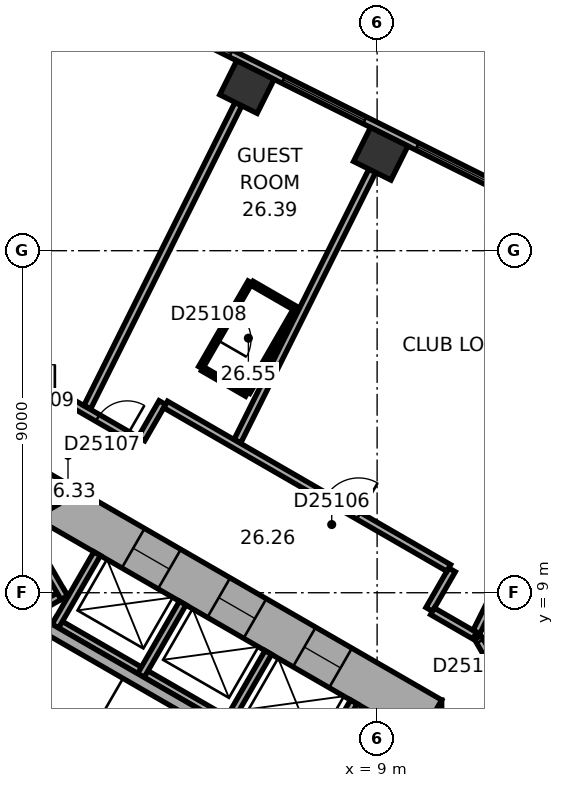
"""IFC4 building model, lengths in metres.
Left out: names, types, materials, properties, quantities, classifications, styles, units other than length and angle.
Written with IfcOpenShell. Run it as: python <this file> out.ifc"""

import sys

from ifc_helpers import new_model, si_unit, direction, frame, frame_2d, origin, origin_2d, place, context, subcontext, project, spatial, rectangle, extrude, element, fill, save


model = new_model("IFC4")
c1 = context("Model", 3, precision=1e-05, world=origin(), true_north=direction((0.0, 1.0)))
c2 = subcontext(c1, "Body", "Model", "MODEL_VIEW")
j1 = project(units=[si_unit("LENGTHUNIT", "METRE"), si_unit("PLANEANGLEUNIT", "RADIAN")], contexts=[c1])
p1 = place(None, origin())
s1 = spatial("IfcSite", under=j1, at=p1, CompositionType="ELEMENT")
p2 = place(p1, origin())
s2 = spatial("IfcBuilding", under=s1, at=p2, CompositionType="ELEMENT")
p3 = place(p2, frame((0.0, 0.0, 110.0)))
s3 = spatial("IfcBuildingStorey", under=s2, at=p3, CompositionType="ELEMENT", Elevation=110.0)
for number, where, z_axis, x_axis in (
    (1, (9.095, 20.551, 0.0), (0.0, 0.0, 1.0), (-0.895, 0.446, 0.0)),
    (2, (5.574, 22.306, 0.0), (0.0, 0.0, 1.0), (-0.895, 0.446, 0.0)),
):
    element("IfcColumn", number, at=place(p3, frame(where, z_axis=z_axis, x_axis=x_axis)), inside=s3, PredefinedType="COLUMN", context=c2, shape_type="SweptSolid", body=[
        extrude(rectangle(XDim=1.1, YDim=1.0, at=origin_2d()), origin(), (0.0, 0.0, 1.0), 3.3),
    ])
p4 = place(p3, frame((10.1, -6.177, 0.0), z_axis=(0.0, 0.0, 1.0), x_axis=(0.0, 1.0, 0.0)))
e3 = element("IfcWall", 3, at=p4, inside=s3, PredefinedType="SHEAR", context=c2, shape_type="SweptSolid", body=[
    extrude(rectangle(XDim=12.355, YDim=1.2, at=frame_2d((6.177, 0.0))), origin(), (0.0, 0.0, 1.0), 3.3),
])
p5 = place(p4, frame((6.378, 0.0, 0.0)))
e4 = element("IfcOpeningElement", 4, at=p5, cuts=e3, PredefinedType="OPENING", context=c2, shape_type="SweptSolid", body=[
    extrude(rectangle(XDim=1.5, YDim=2.1, at=frame_2d((0.75, 1.05))), frame((0.0, 0.61, 0.0), z_axis=(0.0, -1.0, 0.0), x_axis=(1.0, 0.0, 0.0)), (0.0, 0.0, 1.0), 1.22),
])
p6 = place(p4, frame((1.828, 0.0, 0.0)))
e5 = element("IfcOpeningElement", 5, at=p6, cuts=e3, PredefinedType="OPENING", context=c2, shape_type="SweptSolid", body=[
    extrude(rectangle(XDim=1.1, YDim=2.1, at=frame_2d((0.55, 1.05))), frame((0.0, 0.61, 0.0), z_axis=(0.0, -1.0, 0.0), x_axis=(1.0, 0.0, 0.0)), (0.0, 0.0, 1.0), 1.22),
])
p7 = place(p4, frame((4.427, 0.0, 0.0)))
e6 = element("IfcOpeningElement", 6, at=p7, cuts=e3, PredefinedType="OPENING", context=c2, shape_type="SweptSolid", body=[
    extrude(rectangle(XDim=1.1, YDim=2.1, at=frame_2d((0.55, 1.05))), frame((0.0, 0.61, 0.0), z_axis=(0.0, -1.0, 0.0), x_axis=(1.0, 0.0, 0.0)), (0.0, 0.0, 1.0), 1.22),
])
p8 = place(p3, frame((10.4, 5.658, 0.0), z_axis=(0.0, 0.0, 1.0), x_axis=(-0.866021384402, 0.500006961711, 0.0)))
e7 = element("IfcWall", 7, at=p8, inside=s3, PredefinedType="SHEAR", context=c2, shape_type="SweptSolid", body=[
    extrude(rectangle(XDim=12.355, YDim=1.2, at=frame_2d((6.178, 0.0))), origin(), (0.0, 0.0, 1.0), 3.3),
])
p9 = place(p8, frame((2.728, 0.0, 0.0)))
e8 = element("IfcOpeningElement", 8, at=p9, cuts=e7, PredefinedType="OPENING", context=c2, shape_type="SweptSolid", body=[
    extrude(rectangle(XDim=1.1, YDim=2.1, at=frame_2d((0.55, 1.05))), frame((0.0, 0.61, 0.0), z_axis=(0.0, -1.0, 0.0), x_axis=(1.0, 0.0, 0.0)), (0.0, 0.0, 1.0), 1.22),
])
p10 = place(p8, frame((5.328, 0.0, 0.0)))
e9 = element("IfcOpeningElement", 9, at=p10, cuts=e7, PredefinedType="OPENING", context=c2, shape_type="SweptSolid", body=[
    extrude(rectangle(XDim=1.1, YDim=2.1, at=frame_2d((0.55, 1.05))), frame((0.0, 0.61, 0.0), z_axis=(0.0, -1.0, 0.0), x_axis=(1.0, 0.0, 0.0)), (0.0, 0.0, 1.0), 1.22),
])
p11 = place(p8, frame((7.928, 0.0, 0.0)))
e10 = element("IfcOpeningElement", 10, at=p11, cuts=e7, PredefinedType="OPENING", context=c2, shape_type="SweptSolid", body=[
    extrude(rectangle(XDim=1.1, YDim=2.1, at=frame_2d((0.55, 1.05))), frame((0.0, 0.61, 0.0), z_axis=(0.0, -1.0, 0.0), x_axis=(1.0, 0.0, 0.0)), (0.0, 0.0, 1.0), 1.22),
])
p12 = place(p3, frame((0.3, 11.836, 0.0), z_axis=(0.0, 0.0, 1.0), x_axis=(-0.866021384402, -0.500006961711, 0.0)))
e11 = element("IfcWall", 11, at=p12, inside=s3, PredefinedType="SHEAR", context=c2, shape_type="SweptSolid", body=[
    extrude(rectangle(XDim=12.355, YDim=1.2, at=frame_2d((6.178, 0.0))), origin(), (0.0, 0.0, 1.0), 3.3),
])
p13 = place(p12, frame((6.378, 0.0, 0.0)))
e12 = element("IfcOpeningElement", 12, at=p13, cuts=e11, PredefinedType="OPENING", context=c2, shape_type="SweptSolid", body=[
    extrude(rectangle(XDim=1.5, YDim=2.1, at=frame_2d((0.75, 1.05))), frame((0.0, 0.61, 0.0), z_axis=(0.0, -1.0, 0.0), x_axis=(1.0, 0.0, 0.0)), (0.0, 0.0, 1.0), 1.22),
])
p14 = place(p12, frame((1.828, 0.0, 0.0)))
e13 = element("IfcOpeningElement", 13, at=p14, cuts=e11, PredefinedType="OPENING", context=c2, shape_type="SweptSolid", body=[
    extrude(rectangle(XDim=1.1, YDim=2.1, at=frame_2d((0.55, 1.05))), frame((0.0, 0.61, 0.0), z_axis=(0.0, -1.0, 0.0), x_axis=(1.0, 0.0, 0.0)), (0.0, 0.0, 1.0), 1.22),
])
p15 = place(p3, frame((20.63, 15.47, 0.0), z_axis=(0.0, 0.0, 1.0), x_axis=(-0.894934518609, 0.446197498203, 0.0)))
e14 = element("IfcWall", 14, at=p15, inside=s3, PredefinedType="STANDARD", context=c2, shape_type="SweptSolid", body=[
    extrude(rectangle(XDim=21.246, YDim=0.2, at=frame_2d((10.623, 0.0))), origin(), (0.0, 0.0, 1.0), 3.3),
])
p16 = place(p15, frame((1.553, 0.0, 0.8)))
e15 = element("IfcOpeningElement", 15, at=p16, cuts=e14, PredefinedType="OPENING", context=c2, shape_type="SweptSolid", body=[
    extrude(rectangle(XDim=2.4, YDim=1.7, at=frame_2d((1.2, 0.85))), frame((0.0, 0.11, 0.0), z_axis=(0.0, -1.0, 0.0), x_axis=(1.0, 0.0, 0.0)), (0.0, 0.0, 1.0), 0.22),
])
p17 = place(p15, frame((5.488, 0.0, 0.8)))
e16 = element("IfcOpeningElement", 16, at=p17, cuts=e14, PredefinedType="OPENING", context=c2, shape_type="SweptSolid", body=[
    extrude(rectangle(XDim=2.4, YDim=1.7, at=frame_2d((1.2, 0.85))), frame((0.0, 0.11, 0.0), z_axis=(0.0, -1.0, 0.0), x_axis=(1.0, 0.0, 0.0)), (0.0, 0.0, 1.0), 0.22),
])
p18 = place(p15, frame((9.422, 0.0, 0.8)))
e17 = element("IfcOpeningElement", 17, at=p18, cuts=e14, PredefinedType="OPENING", context=c2, shape_type="SweptSolid", body=[
    extrude(rectangle(XDim=2.4, YDim=1.7, at=frame_2d((1.2, 0.85))), frame((0.0, 0.11, 0.0), z_axis=(0.0, -1.0, 0.0), x_axis=(1.0, 0.0, 0.0)), (0.0, 0.0, 1.0), 0.22),
])
p19 = place(p15, frame((13.357, 0.0, 0.8)))
e18 = element("IfcOpeningElement", 18, at=p19, cuts=e14, PredefinedType="OPENING", context=c2, shape_type="SweptSolid", body=[
    extrude(rectangle(XDim=2.4, YDim=1.7, at=frame_2d((1.2, 0.85))), frame((0.0, 0.11, 0.0), z_axis=(0.0, -1.0, 0.0), x_axis=(1.0, 0.0, 0.0)), (0.0, 0.0, 1.0), 0.22),
])
p20 = place(p15, frame((17.292, 0.0, 0.8)))
e19 = element("IfcOpeningElement", 19, at=p20, cuts=e14, PredefinedType="OPENING", context=c2, shape_type="SweptSolid", body=[
    extrude(rectangle(XDim=2.4, YDim=1.7, at=frame_2d((1.2, 0.85))), frame((0.0, 0.11, 0.0), z_axis=(0.0, -1.0, 0.0), x_axis=(1.0, 0.0, 0.0)), (0.0, 0.0, 1.0), 0.22),
])
p21 = place(p3, frame((7.424, 4.259, 0.0), z_axis=(0.0, 0.0, 1.0), x_axis=(-0.866026010844, 0.49999894854, 0.0)))
e20 = element("IfcWall", 20, at=p21, inside=s3, PredefinedType="PARTITIONING", context=c2, shape_type="SweptSolid", body=[
    extrude(rectangle(XDim=8.0, YDim=0.2, at=frame_2d((4.0, 0.0))), origin(), (0.0, 0.0, 1.0), 3.05),
])
for number, where, z_axis, x_axis in (
    (21, (7.287, 4.222, 0.0), (0.0, 0.0, 1.0), (0.5, 0.866, 0.0)),
    (22, (5.036, 5.522, 0.0), (0.0, 0.0, 1.0), (0.5, 0.866, 0.0)),
    (23, (2.784, 6.822, 0.0), (0.0, 0.0, 1.0), (0.5, 0.866, 0.0)),
    (24, (0.532, 8.122, 0.0), (0.0, 0.0, 1.0), (0.5, 0.866, 0.0)),
):
    element("IfcWall", number, at=place(p3, frame(where, z_axis=z_axis, x_axis=x_axis)), inside=s3, PredefinedType="PARTITIONING", context=c2, shape_type="SweptSolid", body=[
        extrude(rectangle(XDim=2.2, YDim=0.2, at=frame_2d((1.1, 0.0))), origin(), (0.0, 0.0, 1.0), 3.05),
    ])
p22 = place(p3, frame((0.803, 9.009, 0.0), z_axis=(0.0, 0.0, 1.0), x_axis=(-0.866028230842, -0.499995103361, 0.0)))
e25 = element("IfcWall", 25, at=p22, inside=s3, PredefinedType="PARTITIONING", context=c2, shape_type="SweptSolid", body=[
    extrude(rectangle(XDim=5.4, YDim=0.2, at=frame_2d((2.7, 0.0))), origin(), (0.0, 0.0, 1.0), 3.05),
])
p23 = place(p3, frame((0.767, 8.872, 0.0), z_axis=(0.0, 0.0, 1.0), x_axis=(-0.499994660107, 0.866028486751, 0.0)))
e26 = element("IfcWall", 26, at=p23, inside=s3, PredefinedType="PARTITIONING", context=c2, shape_type="SweptSolid", body=[
    extrude(rectangle(XDim=2.2, YDim=0.2, at=frame_2d((1.1, 0.0))), origin(), (0.0, 0.0, 1.0), 3.05),
])
p24 = place(p3, frame((6.303, 4.617, 0.0), z_axis=(0.0, 0.0, 1.0), x_axis=(-0.866027801685, 0.499995846692, 0.0)))
e27 = element("IfcWall", 27, at=p24, inside=s3, PredefinedType="SHEAR", context=c2, shape_type="SweptSolid", body=[
    extrude(rectangle(XDim=7.06, YDim=0.3, at=frame_2d((3.53, 0.0))), origin(), (0.0, 0.0, 1.0), 3.05),
])
p25 = place(p3, frame((0.95, 14.001, 0.0), z_axis=(0.0, 0.0, 1.0), x_axis=(-1.0, 0.0, 0.0)))
e28 = element("IfcWall", 28, at=p25, inside=s3, PredefinedType="PARTITIONING", context=c2, shape_type="SweptSolid", body=[
    extrude(rectangle(XDim=1.86, YDim=0.2, at=frame_2d((0.93, 0.0))), origin(), (0.0, 0.0, 1.0), 3.05),
])
p26 = place(p25, frame((0.43, 0.0, 0.0)))
e29 = element("IfcOpeningElement", 29, at=p26, cuts=e28, PredefinedType="OPENING", context=c2, shape_type="SweptSolid", body=[
    extrude(rectangle(XDim=1.0, YDim=2.1, at=frame_2d((0.5, 1.05))), frame((0.0, 0.11, 0.0), z_axis=(0.0, -1.0, 0.0), x_axis=(1.0, 0.0, 0.0)), (0.0, 0.0, 1.0), 0.22),
])
p27 = place(p3, frame((2.748, 12.962, 0.0), z_axis=(0.0, 0.0, 1.0), x_axis=(-0.866013897511, 0.50001992892, 0.0)))
e30 = element("IfcWall", 30, at=p27, inside=s3, PredefinedType="PARTITIONING", context=c2, shape_type="SweptSolid", body=[
    extrude(rectangle(XDim=2.037, YDim=0.2, at=frame_2d((1.018, 0.0))), origin(), (0.0, 0.0, 1.0), 3.05),
])
p28 = place(p27, frame((0.372, 0.0, 0.0)))
e31 = element("IfcOpeningElement", 31, at=p28, cuts=e30, PredefinedType="OPENING", context=c2, shape_type="SweptSolid", body=[
    extrude(rectangle(XDim=0.9, YDim=2.1, at=frame_2d((0.45, 1.05))), frame((0.0, 0.11, 0.0), z_axis=(0.0, -1.0, 0.0), x_axis=(1.0, 0.0, 0.0)), (0.0, 0.0, 1.0), 0.22),
])
p29 = place(p3, frame((3.349, 14.002, 0.0), z_axis=(0.0, 0.0, 1.0), x_axis=(-0.500074377092, -0.865982457891, 0.0)))
e32 = element("IfcWall", 32, at=p29, inside=s3, PredefinedType="PARTITIONING", context=c2, shape_type="SweptSolid", body=[
    extrude(rectangle(XDim=1.101, YDim=0.2, at=frame_2d((0.55, 0.0))), origin(), (0.0, 0.0, 1.0), 3.05),
])
p30 = place(p3, frame((4.356, 14.922, 0.0), z_axis=(0.0, 0.0, 1.0), x_axis=(0.499936506574, 0.866062058628, 0.0)))
e33 = element("IfcWall", 33, at=p30, inside=s3, PredefinedType="PARTITIONING", context=c2, shape_type="SweptSolid", body=[
    extrude(rectangle(XDim=2.6, YDim=0.12, at=frame_2d((1.3, 0.0))), origin(), (0.0, 0.0, 1.0), 3.05),
])
p31 = place(p30, frame((0.85, 0.0, 0.0)))
e34 = element("IfcOpeningElement", 34, at=p31, cuts=e33, PredefinedType="OPENING", context=c2, shape_type="SweptSolid", body=[
    extrude(rectangle(XDim=0.9, YDim=2.1, at=frame_2d((0.45, 1.05))), frame((0.0, 0.07, 0.0), z_axis=(0.0, -1.0, 0.0), x_axis=(1.0, 0.0, 0.0)), (0.0, 0.0, 1.0), 0.14),
])
p32 = place(p3, frame((5.351, 21.859, 0.0), z_axis=(0.0, 0.0, 1.0), x_axis=(-0.446205309328, -0.894930624086, 0.0)))
e35 = element("IfcWall", 35, at=p32, inside=s3, PredefinedType="PARTITIONING", context=c2, shape_type="SweptSolid", body=[
    extrude(rectangle(XDim=8.913, YDim=0.2, at=frame_2d((4.457, 0.0))), origin(), (0.0, 0.0, 1.0), 2.6),
])
p33 = place(p3, frame((5.569, 14.222, 0.0), z_axis=(0.0, 0.0, 1.0), x_axis=(-0.866036909293, 0.499980071345, 0.0)))
e36 = element("IfcWall", 36, at=p33, inside=s3, PredefinedType="PARTITIONING", context=c2, shape_type="SweptSolid", body=[
    extrude(rectangle(XDim=1.34, YDim=0.12, at=frame_2d((0.67, 0.0))), origin(), (0.0, 0.0, 1.0), 3.05),
])
p34 = place(p3, frame((5.708, 17.144, 0.0), z_axis=(0.0, 0.0, 1.0), x_axis=(0.866082447003, -0.499901185229, 0.0)))
e37 = element("IfcWall", 37, at=p34, inside=s3, PredefinedType="PARTITIONING", context=c2, shape_type="SweptSolid", body=[
    extrude(rectangle(XDim=1.34, YDim=0.12, at=frame_2d((0.67, 0.0))), origin(), (0.0, 0.0, 1.0), 3.05),
])
p35 = place(p3, frame((6.839, 16.422, 0.0), z_axis=(0.0, 0.0, 1.0), x_axis=(-0.50000366821, -0.866023285932, 0.0)))
e38 = element("IfcWall", 38, at=p35, inside=s3, PredefinedType="PARTITIONING", context=c2, shape_type="SweptSolid", body=[
    extrude(rectangle(XDim=2.48, YDim=0.12, at=frame_2d((1.24, 0.0))), origin(), (0.0, 0.0, 1.0), 3.05),
])
p36 = place(p3, frame((8.872, 20.104, 0.0), z_axis=(0.0, 0.0, 1.0), x_axis=(-0.446218378653, -0.894924107706, 0.0)))
e39 = element("IfcWall", 39, at=p36, inside=s3, PredefinedType="PARTITIONING", context=c2, shape_type="SweptSolid", body=[
    extrude(rectangle(XDim=7.95, YDim=0.2, at=frame_2d((3.975, 0.0))), origin(), (0.0, 0.0, 1.0), 3.05),
])
p37 = place(p3, frame((10.371, 8.561, 0.0), z_axis=(0.0, 0.0, 1.0), x_axis=(0.499986357472, 0.866033280158, 0.0)))
e40 = element("IfcWall", 40, at=p37, inside=s3, PredefinedType="PARTITIONING", context=c2, shape_type="SweptSolid", body=[
    extrude(rectangle(XDim=1.201, YDim=0.2, at=frame_2d((0.601, 0.0))), origin(), (0.0, 0.0, 1.0), 3.05),
])
p38 = place(p3, frame((10.885, 9.652, 0.0), z_axis=(0.0, 0.0, 1.0), x_axis=(-0.866033868542, 0.499985338323, 0.0)))
e41 = element("IfcWall", 41, at=p38, inside=s3, PredefinedType="PARTITIONING", context=c2, shape_type="SweptSolid", body=[
    extrude(rectangle(XDim=8.602, YDim=0.2, at=frame_2d((4.301, 0.0))), origin(), (0.0, 0.0, 1.0), 3.05),
])
p39 = place(p38, frame((2.739, 0.0, 0.0)))
e42 = element("IfcOpeningElement", 42, at=p39, cuts=e41, PredefinedType="OPENING", context=c2, shape_type="SweptSolid", body=[
    extrude(rectangle(XDim=1.0, YDim=2.1, at=frame_2d((0.5, 1.05))), frame((0.0, 0.11, 0.0), z_axis=(0.0, -1.0, 0.0), x_axis=(1.0, 0.0, 0.0)), (0.0, 0.0, 1.0), 0.22),
])
p40 = place(p3, frame((11.566, 7.871, 0.0), z_axis=(0.0, 0.0, 1.0), x_axis=(-0.866004557827, 0.500036104519, 0.0)))
e43 = element("IfcWall", 43, at=p40, inside=s3, PredefinedType="PARTITIONING", context=c2, shape_type="SweptSolid", body=[
    extrude(rectangle(XDim=1.28, YDim=0.2, at=frame_2d((0.64, 0.0))), origin(), (0.0, 0.0, 1.0), 3.05),
])
p41 = place(p3, frame((12.218, 6.839, 0.0), z_axis=(0.0, 0.0, 1.0), x_axis=(-0.500044870432, 0.865999496279, 0.0)))
e44 = element("IfcWall", 44, at=p41, inside=s3, PredefinedType="PARTITIONING", context=c2, shape_type="SweptSolid", body=[
    extrude(rectangle(XDim=1.136, YDim=0.2, at=frame_2d((0.568, 0.0))), origin(), (0.0, 0.0, 1.0), 3.05),
])
p42 = place(p41, frame((0.118, 0.0, 0.0)))
e45 = element("IfcOpeningElement", 45, at=p42, cuts=e44, PredefinedType="OPENING", context=c2, shape_type="SweptSolid", body=[
    extrude(rectangle(XDim=0.9, YDim=2.1, at=frame_2d((0.45, 1.05))), frame((0.0, 0.11, 0.0), z_axis=(0.0, -1.0, 0.0), x_axis=(1.0, 0.0, 0.0)), (0.0, 0.0, 1.0), 0.22),
])
p43 = place(p3, frame((15.915, 16.592, 0.0), z_axis=(0.0, 0.0, 1.0), x_axis=(-0.446199736347, -0.894933402709, 0.0)))
e46 = element("IfcWall", 46, at=p43, inside=s3, PredefinedType="PARTITIONING", context=c2, shape_type="SweptSolid", body=[
    extrude(rectangle(XDim=9.635, YDim=0.2, at=frame_2d((4.817, 0.0))), origin(), (0.0, 0.0, 1.0), 3.05),
])
p44 = place(p18, origin())
e47 = element("IfcWindow", 47, at=p44, inside=s3, PartitioningType="SINGLE_PANEL", PredefinedType="WINDOW", context=c2, shape_type="SweptSolid", body=[
    extrude(rectangle(XDim=2.4, YDim=1.7, at=frame_2d((1.2, 0.85))), frame((0.0, 0.03, 0.0), z_axis=(0.0, -1.0, 0.0), x_axis=(1.0, 0.0, 0.0)), (0.0, 0.0, 1.0), 0.06),
])
fill(e17, e47)
p45 = place(p19, origin())
e48 = element("IfcWindow", 48, at=p45, inside=s3, PartitioningType="SINGLE_PANEL", PredefinedType="WINDOW", context=c2, shape_type="SweptSolid", body=[
    extrude(rectangle(XDim=2.4, YDim=1.7, at=frame_2d((1.2, 0.85))), frame((0.0, 0.03, 0.0), z_axis=(0.0, -1.0, 0.0), x_axis=(1.0, 0.0, 0.0)), (0.0, 0.0, 1.0), 0.06),
])
fill(e18, e48)
p46 = place(p20, origin())
e49 = element("IfcWindow", 49, at=p46, inside=s3, PartitioningType="SINGLE_PANEL", PredefinedType="WINDOW", context=c2, shape_type="SweptSolid", body=[
    extrude(rectangle(XDim=2.4, YDim=1.7, at=frame_2d((1.2, 0.85))), frame((0.0, 0.03, 0.0), z_axis=(0.0, -1.0, 0.0), x_axis=(1.0, 0.0, 0.0)), (0.0, 0.0, 1.0), 0.06),
])
fill(e19, e49)
p47 = place(p9, origin())
e50 = element("IfcDoor", 50, at=p47, inside=s3, OperationType="DOUBLE_DOOR_SLIDING", PredefinedType="DOOR", context=c2, shape_type="SweptSolid", body=[
    extrude(rectangle(XDim=1.1, YDim=2.1, at=frame_2d((0.55, 1.05))), frame((0.0, 0.025, 0.0), z_axis=(0.0, -1.0, 0.0), x_axis=(1.0, 0.0, 0.0)), (0.0, 0.0, 1.0), 0.05),
])
fill(e8, e50)
p48 = place(p10, origin())
e51 = element("IfcDoor", 51, at=p48, inside=s3, OperationType="DOUBLE_DOOR_SLIDING", PredefinedType="DOOR", context=c2, shape_type="SweptSolid", body=[
    extrude(rectangle(XDim=1.1, YDim=2.1, at=frame_2d((0.55, 1.05))), frame((0.0, 0.025, 0.0), z_axis=(0.0, -1.0, 0.0), x_axis=(1.0, 0.0, 0.0)), (0.0, 0.0, 1.0), 0.05),
])
fill(e9, e51)
p49 = place(p11, origin())
e52 = element("IfcDoor", 52, at=p49, inside=s3, OperationType="DOUBLE_DOOR_SLIDING", PredefinedType="DOOR", context=c2, shape_type="SweptSolid", body=[
    extrude(rectangle(XDim=1.1, YDim=2.1, at=frame_2d((0.55, 1.05))), frame((0.0, 0.025, 0.0), z_axis=(0.0, -1.0, 0.0), x_axis=(1.0, 0.0, 0.0)), (0.0, 0.0, 1.0), 0.05),
])
fill(e10, e52)
p50 = place(p42, origin())
e53 = element("IfcDoor", 53, at=p50, inside=s3, OperationType="SINGLE_SWING_LEFT", PredefinedType="DOOR", context=c2, shape_type="SweptSolid", body=[
    extrude(rectangle(XDim=0.9, YDim=2.1, at=frame_2d((0.45, 1.05))), frame((0.0, 0.025, 0.0), z_axis=(0.0, -1.0, 0.0), x_axis=(1.0, 0.0, 0.0)), (0.0, 0.0, 1.0), 0.05),
])
fill(e45, e53)
p51 = place(p39, origin())
e54 = element("IfcDoor", 54, at=p51, inside=s3, OperationType="SINGLE_SWING_LEFT", PredefinedType="DOOR", context=c2, shape_type="SweptSolid", body=[
    extrude(rectangle(XDim=1.0, YDim=2.1, at=frame_2d((0.5, 1.05))), frame((0.0, 0.025, 0.0), z_axis=(0.0, -1.0, 0.0), x_axis=(1.0, 0.0, 0.0)), (0.0, 0.0, 1.0), 0.05),
])
fill(e42, e54)
p52 = place(p28, origin())
e55 = element("IfcDoor", 55, at=p52, inside=s3, OperationType="SINGLE_SWING_LEFT", PredefinedType="DOOR", context=c2, shape_type="SweptSolid", body=[
    extrude(rectangle(XDim=0.9, YDim=2.1, at=frame_2d((0.45, 1.05))), frame((0.0, 0.025, 0.0), z_axis=(0.0, -1.0, 0.0), x_axis=(1.0, 0.0, 0.0)), (0.0, 0.0, 1.0), 0.05),
])
fill(e31, e55)
p53 = place(p31, origin())
e56 = element("IfcDoor", 56, at=p53, inside=s3, OperationType="SINGLE_SWING_LEFT", PredefinedType="DOOR", context=c2, shape_type="SweptSolid", body=[
    extrude(rectangle(XDim=0.9, YDim=2.1, at=frame_2d((0.45, 1.05))), frame((0.0, 0.025, 0.0), z_axis=(0.0, -1.0, 0.0), x_axis=(1.0, 0.0, 0.0)), (0.0, 0.0, 1.0), 0.05),
])
fill(e34, e56)
p54 = place(p26, origin())
e57 = element("IfcDoor", 57, at=p54, inside=s3, OperationType="SINGLE_SWING_LEFT", PredefinedType="DOOR", context=c2, shape_type="SweptSolid", body=[
    extrude(rectangle(XDim=1.0, YDim=2.1, at=frame_2d((0.5, 1.05))), frame((0.0, 0.025, 0.0), z_axis=(0.0, -1.0, 0.0), x_axis=(1.0, 0.0, 0.0)), (0.0, 0.0, 1.0), 0.05),
])
fill(e29, e57)
save(model, sys.argv[1])
